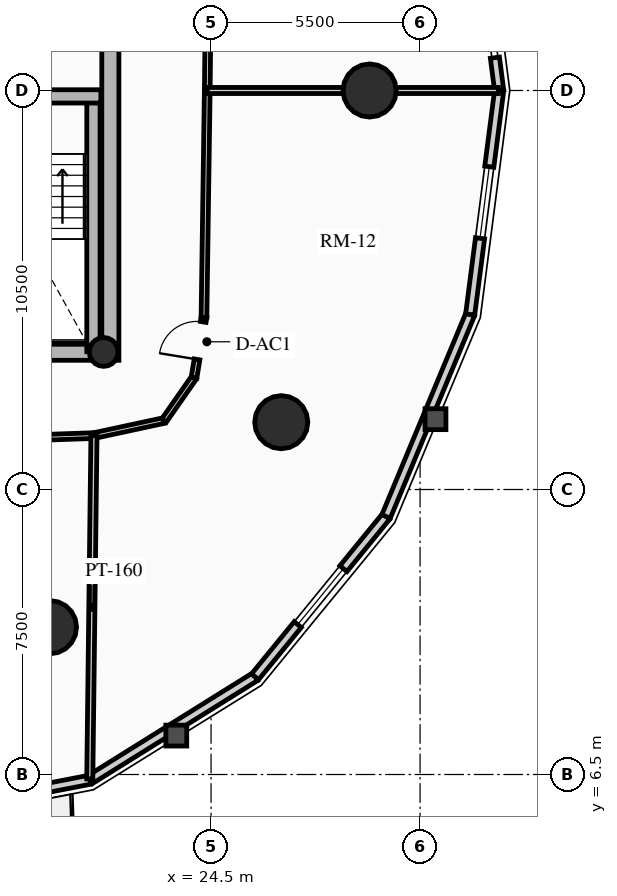
"""IFC4 building model, lengths in metres.
Left out: names, types, materials, properties, quantities, classifications, styles, units other than length and angle.
Written with IfcOpenShell. Run it as: python <this file> out.ifc"""

import sys

from ifc_helpers import new_model, si_unit, direction, frame, frame_2d, origin, origin_2d, place, context, subcontext, project, spatial, rectangle, circle, hollow_circle, extrude, source, transform, mapped, element, fill, save


model = new_model("IFC4")
c1 = context("Model", 3, precision=1e-05, world=origin(), true_north=direction((0.0, 1.0)))
c2 = subcontext(c1, "Body", "Model", "MODEL_VIEW")
j1 = project(units=[si_unit("LENGTHUNIT", "METRE"), si_unit("PLANEANGLEUNIT", "RADIAN")], contexts=[c1])
p1 = place(None, origin())
s1 = spatial("IfcSite", under=j1, at=p1, CompositionType="ELEMENT")
p2 = place(p1, origin())
s2 = spatial("IfcBuilding", under=s1, at=p2, CompositionType="ELEMENT")
p3 = place(p2, frame((0.0, 0.0, 70.15)))
s3 = spatial("IfcBuildingStorey", under=s2, at=p3, CompositionType="ELEMENT", Elevation=70.15)
p4 = place(p3, frame((21.85, 17.4, 0.0), z_axis=(0.0, 0.0, 1.0), x_axis=(0.0, 1.0, 0.0)))
e1 = element("IfcWall", 1, at=p4, inside=s3, PredefinedType="SHEAR", context=c2, shape_type="SweptSolid", body=[
    extrude(rectangle(XDim=14.2, YDim=0.45, at=frame_2d((7.1, 0.0))), origin(), (0.0, 0.0, 1.0), 2.91),
])
p5 = place(p3, frame((11.15, 17.625, 0.0), z_axis=(0.0, 0.0, 1.0), x_axis=(1.0, 0.0, 0.0)))
e2 = element("IfcWall", 2, at=p5, inside=s3, PredefinedType="SHEAR", context=c2, shape_type="SweptSolid", body=[
    extrude(rectangle(XDim=10.7, YDim=0.45, at=frame_2d((5.35, 0.0))), origin(), (0.0, 0.0, 1.0), 2.91),
])
m1 = source(origin(), c2, "Body", "SweptSolid", [
    extrude(rectangle(XDim=1.5, YDim=2.02, at=frame_2d((0.75, 1.01))), frame((0.0, 0.235, 0.0), z_axis=(0.0, -1.0, 0.0), x_axis=(1.0, 0.0, 0.0)), (0.0, 0.0, 1.0), 0.47),
])
p6 = place(p5, frame((5.45, 0.0, 0.0)))
e3 = element("IfcOpeningElement", 3, at=p6, cuts=e2, PredefinedType="OPENING", context=c2, shape_type="MappedRepresentation", body=[
    mapped(m1, transform((0.0, 0.0, 0.0), x_axis=(1.0, 0.0, 0.0), y_axis=(0.0, 1.0, 0.0), z_axis=(0.0, 0.0, 1.0), scale=1.0)),
])
p7 = place(p3, frame((21.405, 17.625, 0.0), z_axis=(0.0, 0.0, 1.0), x_axis=(0.0, 1.0, 0.0)))
e4 = element("IfcWall", 4, at=p7, inside=s3, PredefinedType="SHEAR", context=c2, shape_type="SweptSolid", body=[
    extrude(rectangle(XDim=6.72, YDim=0.35, at=frame_2d((3.36, 0.0))), origin(), (0.0, 0.0, 1.0), 2.91),
])
p8 = place(p3, frame((18.315, 24.345, 0.0), z_axis=(0.0, 0.0, 1.0), x_axis=(1.0, 0.0, 0.0)))
e5 = element("IfcWall", 5, at=p8, inside=s3, PredefinedType="SHEAR", context=c2, shape_type="SweptSolid", body=[
    extrude(rectangle(XDim=3.285, YDim=0.35, at=frame_2d((1.643, 0.0))), origin(), (0.0, 0.0, 1.0), 2.91),
])
p9 = place(p3, frame((21.675, 17.62, 0.0), z_axis=(0.0, 0.0, 1.0), x_axis=(1.0, 0.0, 0.0)))
e6 = element("IfcColumn", 6, at=p9, inside=s3, PredefinedType="COLUMN", context=c2, shape_type="SweptSolid", body=[
    extrude(hollow_circle(Radius=0.38, WallThickness=0.032, at=origin_2d()), origin(), (0.0, 0.0, 1.0), 2.91),
])
for number, where, z_axis, x_axis in (
    (7, (28.672, 24.5, 0.0), (0.0, 0.0, 1.0), (1.0, 0.0, 0.0)),
    (8, (20.261, 10.377, 0.0), (0.0, 0.0, 1.0), (1.0, 0.0, 0.0)),
    (9, (26.347, 15.771, 0.0), (0.0, 0.0, 1.0), (1.0, 0.0, 0.0)),
):
    element("IfcColumn", number, at=place(p3, frame(where, z_axis=z_axis, x_axis=x_axis)), inside=s3, PredefinedType="USERDEFINED", context=c2, shape_type="SweptSolid", body=[
        extrude(circle(Radius=0.7, at=origin_2d()), origin(), (0.0, 0.0, 1.0), 2.91),
    ])
p10 = place(p3, frame((31.969, 25.363, 0.0), z_axis=(0.0, 0.0, 1.0), x_axis=(0.128523364007, -0.991706481225, 0.0)))
e10 = element("IfcWall", 10, at=p10, inside=s3, PredefinedType="SOLIDWALL", context=c2, shape_type="SweptSolid", body=[
    extrude(rectangle(XDim=0.87, YDim=0.24, at=frame_2d((0.435, 0.0))), origin(), (0.0, 0.0, 1.0), 2.655),
])
p11 = place(p3, frame((21.315, 6.363, 0.0), z_axis=(0.0, 0.0, 1.0), x_axis=(-0.981723785992, -0.190311344954, 0.0)))
e11 = element("IfcWall", 11, at=p11, inside=s3, PredefinedType="SOLIDWALL", context=c2, shape_type="SweptSolid", body=[
    extrude(rectangle(XDim=4.904, YDim=0.24, at=frame_2d((2.452, 0.0))), origin(), (0.0, 0.0, 1.0), 2.179),
])
m2 = source(origin(), c2, "Body", "SweptSolid", [
    extrude(rectangle(XDim=1.15, YDim=2.005, at=frame_2d((0.575, 1.002))), frame((0.0, 0.13, 0.0), z_axis=(0.0, -1.0, 0.0), x_axis=(1.0, 0.0, 0.0)), (0.0, 0.0, 1.0), 0.26),
])
p12 = place(p11, frame((1.877, 0.0, 0.0)))
e12 = element("IfcOpeningElement", 12, at=p12, cuts=e11, PredefinedType="OPENING", context=c2, shape_type="MappedRepresentation", body=[
    mapped(m2, transform((0.0, 0.0, 0.0), x_axis=(1.0, 0.0, 0.0), y_axis=(0.0, 1.0, 0.0), z_axis=(0.0, 0.0, 1.0), scale=1.0)),
])
p13 = place(p3, frame((25.658, 9.072, 0.0), z_axis=(0.0, 0.0, 1.0), x_axis=(-0.848520380187, -0.529162701263, 0.0)))
e13 = element("IfcWall", 13, at=p13, inside=s3, PredefinedType="SOLIDWALL", context=c2, shape_type="SweptSolid", body=[
    extrude(rectangle(XDim=5.119, YDim=0.24, at=frame_2d((2.56, 0.0))), origin(), (0.0, 0.0, 1.0), 2.179),
])
p14 = place(p3, frame((29.105, 13.291, 0.0), z_axis=(0.0, 0.0, 1.0), x_axis=(-0.632700781152, -0.77439635945, 0.0)))
e14 = element("IfcWall", 14, at=p14, inside=s3, PredefinedType="SOLIDWALL", context=c2, shape_type="SweptSolid", body=[
    extrude(rectangle(XDim=5.448, YDim=0.24, at=frame_2d((2.724, 0.0))), origin(), (0.0, 0.0, 1.0), 2.179),
])
m3 = source(origin(), c2, "Body", "SweptSolid", [
    extrude(rectangle(XDim=1.9, YDim=1.35, at=frame_2d((0.95, 0.675))), frame((0.0, 0.13, 0.0), z_axis=(0.0, -1.0, 0.0), x_axis=(1.0, 0.0, 0.0)), (0.0, 0.0, 1.0), 0.26),
])
p15 = place(p14, frame((1.774, 0.0, 0.65)))
e15 = element("IfcOpeningElement", 15, at=p15, cuts=e14, PredefinedType="OPENING", context=c2, shape_type="MappedRepresentation", body=[
    mapped(m3, transform((0.0, 0.0, 0.0), x_axis=(1.0, 0.0, 0.0), y_axis=(0.0, 1.0, 0.0), z_axis=(0.0, 0.0, 1.0), scale=1.0)),
])
p16 = place(p3, frame((31.318, 18.607, 0.0), z_axis=(0.0, 0.0, 1.0), x_axis=(-0.384344417632, -0.923189779317, 0.0)))
e16 = element("IfcWall", 16, at=p16, inside=s3, PredefinedType="SOLIDWALL", context=c2, shape_type="SweptSolid", body=[
    extrude(rectangle(XDim=5.758, YDim=0.24, at=frame_2d((2.879, 0.0))), origin(), (0.0, 0.0, 1.0), 2.179),
])
p17 = place(p3, frame((32.081, 24.5, 0.0), z_axis=(0.0, 0.0, 1.0), x_axis=(-0.128351991996, -0.991728675672, 0.0)))
e17 = element("IfcWall", 17, at=p17, inside=s3, PredefinedType="SOLIDWALL", context=c2, shape_type="SweptSolid", body=[
    extrude(rectangle(XDim=5.942, YDim=0.24, at=frame_2d((2.971, 0.0))), origin(), (0.0, 0.0, 1.0), 2.179),
])
p18 = place(p17, frame((2.021, 0.0, 0.65)))
e18 = element("IfcOpeningElement", 18, at=p18, cuts=e17, PredefinedType="OPENING", context=c2, shape_type="MappedRepresentation", body=[
    mapped(m3, transform((0.0, 0.0, 0.0), x_axis=(1.0, 0.0, 0.0), y_axis=(0.0, 1.0, 0.0), z_axis=(0.0, 0.0, 1.0), scale=1.0)),
])
p19 = place(p3, frame((24.4, 24.5, 0.0), z_axis=(0.0, 0.0, 1.0), x_axis=(0.011359710161, 0.999935476411, 0.0)))
e19 = element("IfcWall", 19, at=p19, inside=s3, PredefinedType="PARTITIONING", context=c2, shape_type="SweptSolid", body=[
    extrude(rectangle(XDim=6.082, YDim=0.15, at=frame_2d((3.041, 0.0))), origin(), (0.0, 0.0, 1.0), 2.225),
])
p20 = place(p3, frame((14.781, 15.191, 0.0), z_axis=(0.0, 0.0, 1.0), x_axis=(0.999412963972, 0.034259705842, 0.0)))
e20 = element("IfcWall", 20, at=p20, inside=s3, PredefinedType="PARTITIONING", context=c2, shape_type="SweptSolid", body=[
    extrude(rectangle(XDim=6.642, YDim=0.15, at=frame_2d((3.321, 0.0))), origin(), (0.0, 0.0, 1.0), 2.225),
])
p21 = place(p3, frame((21.419, 15.418, 0.0), z_axis=(0.0, 0.0, 1.0), x_axis=(0.977540384091, 0.210748184977, 0.0)))
e21 = element("IfcWall", 21, at=p21, inside=s3, PredefinedType="PARTITIONING", context=c2, shape_type="SweptSolid", body=[
    extrude(rectangle(XDim=1.887, YDim=0.15, at=frame_2d((0.944, 0.0))), origin(), (0.0, 0.0, 1.0), 2.225),
])
p22 = place(p3, frame((23.263, 15.816, 0.0), z_axis=(0.0, 0.0, 1.0), x_axis=(0.572652947117, 0.819797903241, 0.0)))
e22 = element("IfcWall", 22, at=p22, inside=s3, PredefinedType="PARTITIONING", context=c2, shape_type="SweptSolid", body=[
    extrude(rectangle(XDim=1.377, YDim=0.15, at=frame_2d((0.688, 0.0))), origin(), (0.0, 0.0, 1.0), 2.225),
])
p23 = place(p3, frame((24.052, 16.945, 0.0), z_axis=(0.0, 0.0, 1.0), x_axis=(0.162869842843, 0.986647563364, 0.0)))
e23 = element("IfcWall", 23, at=p23, inside=s3, PredefinedType="PARTITIONING", context=c2, shape_type="SweptSolid", body=[
    extrude(rectangle(XDim=1.605, YDim=0.15, at=frame_2d((0.803, 0.0))), origin(), (0.0, 0.0, 1.0), 2.225),
])
m4 = source(origin(), c2, "Body", "SweptSolid", [
    extrude(rectangle(XDim=1.0, YDim=2.015, at=frame_2d((0.5, 1.007))), frame((0.0, 0.085, 0.0), z_axis=(0.0, -1.0, 0.0), x_axis=(1.0, 0.0, 0.0)), (0.0, 0.0, 1.0), 0.17),
])
p24 = place(p23, frame((0.485, 0.0, 0.0)))
e24 = element("IfcOpeningElement", 24, at=p24, cuts=e23, PredefinedType="OPENING", context=c2, shape_type="MappedRepresentation", body=[
    mapped(m4, transform((0.0, 0.0, 0.0), x_axis=(1.0, 0.0, 0.0), y_axis=(0.0, 1.0, 0.0), z_axis=(0.0, 0.0, 1.0), scale=1.0)),
])
p25 = place(p3, frame((24.313, 18.529, 0.0), z_axis=(0.0, 0.0, 1.0), x_axis=(0.014472275982, 0.99989527113, 0.0)))
e25 = element("IfcWall", 25, at=p25, inside=s3, PredefinedType="PARTITIONING", context=c2, shape_type="SweptSolid", body=[
    extrude(rectangle(XDim=5.972, YDim=0.15, at=frame_2d((2.986, 0.0))), origin(), (0.0, 0.0, 1.0), 2.655),
])
p26 = place(p3, frame((24.4, 24.5, 0.0), z_axis=(0.0, 0.0, 1.0), x_axis=(1.0, 0.0, 0.0)))
e26 = element("IfcWall", 26, at=p26, inside=s3, PredefinedType="PARTITIONING", context=c2, shape_type="SweptSolid", body=[
    extrude(rectangle(XDim=7.661, YDim=0.16, at=frame_2d((3.831, 0.0))), origin(), (0.0, 0.0, 1.0), 2.179),
])
p27 = place(p3, frame((21.419, 15.418, 0.0), z_axis=(0.0, 0.0, 1.0), x_axis=(-0.012184661849, -0.999925764252, 0.0)))
e27 = element("IfcWall", 27, at=p27, inside=s3, PredefinedType="PARTITIONING", context=c2, shape_type="SweptSolid", body=[
    extrude(rectangle(XDim=9.037, YDim=0.16, at=frame_2d((4.518, 0.0))), origin(), (0.0, 0.0, 1.0), 2.179),
])
m5 = source(origin(), c2, "Body", "SweptSolid", [
    extrude(rectangle(XDim=1.9, YDim=1.35, at=frame_2d((0.95, 0.675))), frame((0.0, 0.03, 0.0), z_axis=(0.0, -1.0, 0.0), x_axis=(1.0, 0.0, 0.0)), (0.0, 0.0, 1.0), 0.06),
])
p28 = place(p15, origin())
e28 = element("IfcWindow", 28, at=p28, inside=s3, PartitioningType="DOUBLE_PANEL_VERTICAL", PredefinedType="WINDOW", context=c2, shape_type="MappedRepresentation", body=[
    mapped(m5, transform((0.0, 0.0, 0.0), x_axis=(1.0, 0.0, 0.0), y_axis=(0.0, 1.0, 0.0), z_axis=(0.0, 0.0, 1.0), scale=1.0)),
])
fill(e15, e28)
p29 = place(p18, origin())
e29 = element("IfcWindow", 29, at=p29, inside=s3, PartitioningType="DOUBLE_PANEL_VERTICAL", PredefinedType="WINDOW", context=c2, shape_type="MappedRepresentation", body=[
    mapped(m5, transform((0.0, 0.0, 0.0), x_axis=(1.0, 0.0, 0.0), y_axis=(0.0, 1.0, 0.0), z_axis=(0.0, 0.0, 1.0), scale=1.0)),
])
fill(e18, e29)
m6 = source(origin(), c2, "Body", "SweptSolid", [
    extrude(rectangle(XDim=1.0, YDim=2.015, at=frame_2d((0.5, 1.007))), frame((0.0, 0.025, 0.0), z_axis=(0.0, -1.0, 0.0), x_axis=(1.0, 0.0, 0.0)), (0.0, 0.0, 1.0), 0.05),
])
p30 = place(p24, origin())
e30 = element("IfcDoor", 30, at=p30, inside=s3, OperationType="SINGLE_SWING_LEFT", PredefinedType="DOOR", context=c2, shape_type="MappedRepresentation", body=[
    mapped(m6, transform((0.0, 0.0, 0.0), x_axis=(1.0, 0.0, 0.0), y_axis=(0.0, 1.0, 0.0), z_axis=(0.0, 0.0, 1.0), scale=1.0)),
])
fill(e24, e30)
save(model, sys.argv[1])
